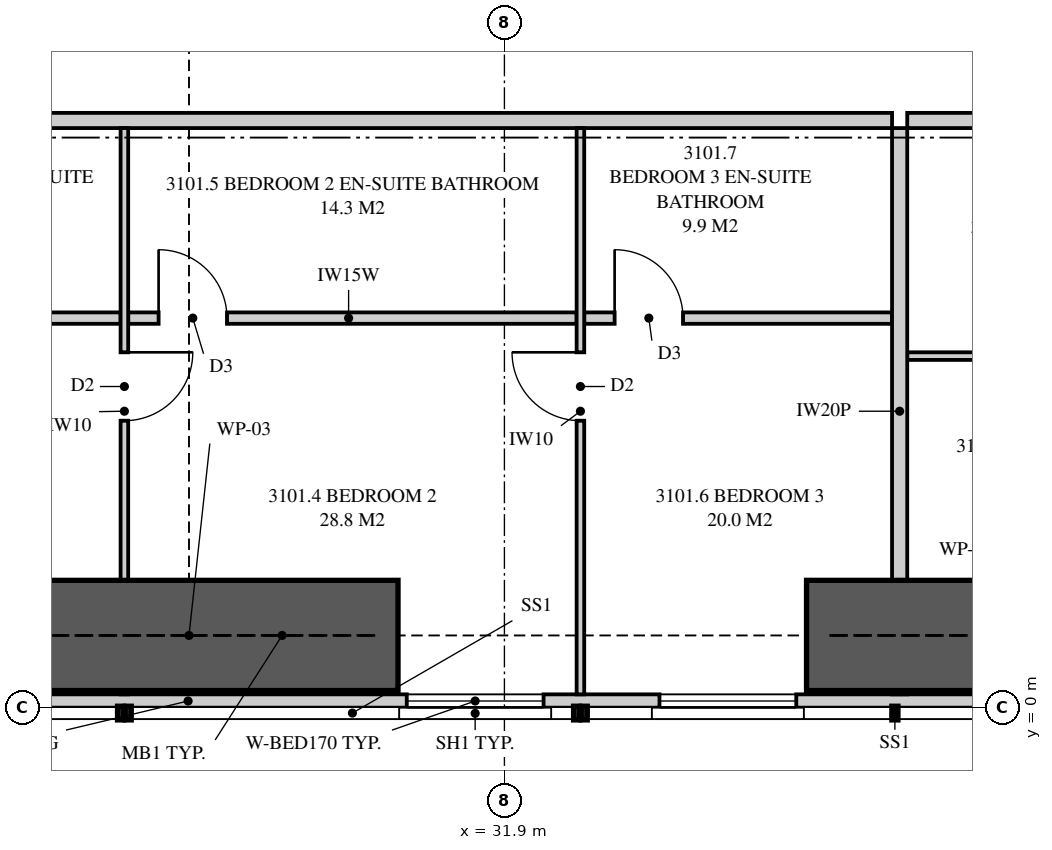
"""IFC4 building model, lengths in metres.
Left out: names, types, materials, properties, quantities, classifications, styles, units other than length and angle.
Written with IfcOpenShell. Run it as: python <this file> out.ifc"""

import sys

from ifc_helpers import new_model, si_unit, direction, frame, frame_2d, origin, place, context, subcontext, project, spatial, polyline, rectangle, outline, extrude, element, fill, save


model = new_model("IFC4")
c1 = context("Model", 3, precision=1e-05, world=origin(), true_north=direction((0.0, 1.0)))
c2 = subcontext(c1, "Body", "Model", "MODEL_VIEW")
j1 = project(units=[si_unit("LENGTHUNIT", "METRE"), si_unit("PLANEANGLEUNIT", "RADIAN")], contexts=[c1])
p1 = place(None, origin())
s1 = spatial("IfcSite", under=j1, at=p1, CompositionType="ELEMENT")
p2 = place(p1, origin())
s2 = spatial("IfcBuilding", under=s1, at=p2, CompositionType="ELEMENT")
p3 = place(p2, frame((0.0, 0.0, 114.9)))
s3 = spatial("IfcBuildingStorey", under=s2, at=p3, CompositionType="ELEMENT", Elevation=114.9)
p4 = place(p3, frame((14.051, 0.087, 0.0), z_axis=(0.0, 0.0, 1.0), x_axis=(1.0, 0.0, 0.0)))
e1 = element("IfcWall", 1, at=p4, inside=s3, PredefinedType="SOLIDWALL", context=c2, shape_type="SweptSolid", body=[
    extrude(outline(polyline([(0.0, 0.0), (27.374, 0.0), (27.374, 3.11), (24.777, 3.11), (24.777, 2.15), (24.732, 2.15), (24.732, 3.11), (24.574, 3.11), (24.574, 2.15), (2.824, 2.15), (2.824, 3.11), (2.666, 3.11), (2.666, 2.15), (2.62, 2.15), (2.62, 3.11), (0.0, 3.11), (0.0, 0.0)])), frame((0.0, 0.087, 0.0), z_axis=(0.0, -1.0, 0.0), x_axis=(1.0, 0.0, 0.0)), (0.0, 0.0, 1.0), 0.175),
])
p5 = place(p4, frame((5.874, 0.0, 0.4)))
e2 = element("IfcOpeningElement", 2, at=p5, cuts=e1, PredefinedType="OPENING", context=c2, shape_type="SweptSolid", body=[
    extrude(rectangle(XDim=1.8, YDim=1.7, at=frame_2d((0.9, 0.85))), frame((0.0, 0.097, 0.0), z_axis=(0.0, -1.0, 0.0), x_axis=(1.0, 0.0, 0.0)), (0.0, 0.0, 1.0), 0.195),
])
p6 = place(p4, frame((9.04, 0.0, 0.4)))
e3 = element("IfcOpeningElement", 3, at=p6, cuts=e1, PredefinedType="OPENING", context=c2, shape_type="SweptSolid", body=[
    extrude(rectangle(XDim=1.8, YDim=1.7, at=frame_2d((0.9, 0.85))), frame((0.0, 0.097, 0.0), z_axis=(0.0, -1.0, 0.0), x_axis=(1.0, 0.0, 0.0)), (0.0, 0.0, 1.0), 0.195),
])
p7 = place(p4, frame((16.564, 0.0, 0.4)))
e4 = element("IfcOpeningElement", 4, at=p7, cuts=e1, PredefinedType="OPENING", context=c2, shape_type="SweptSolid", body=[
    extrude(rectangle(XDim=1.8, YDim=1.7, at=frame_2d((0.9, 0.85))), frame((0.0, 0.097, 0.0), z_axis=(0.0, -1.0, 0.0), x_axis=(1.0, 0.0, 0.0)), (0.0, 0.0, 1.0), 0.195),
])
p8 = place(p4, frame((19.889, 0.0, 0.4)))
e5 = element("IfcOpeningElement", 5, at=p8, cuts=e1, PredefinedType="OPENING", context=c2, shape_type="SweptSolid", body=[
    extrude(rectangle(XDim=1.8, YDim=1.7, at=frame_2d((0.9, 0.85))), frame((0.0, 0.097, 0.0), z_axis=(0.0, -1.0, 0.0), x_axis=(1.0, 0.0, 0.0)), (0.0, 0.0, 1.0), 0.195),
])
p9 = place(p3, frame((37.1, 0.175, 0.0), z_axis=(0.0, 0.0, 1.0), x_axis=(0.0, 1.0, 0.0)))
e6 = element("IfcWall", 6, at=p9, inside=s3, PredefinedType="PARTITIONING", context=c2, shape_type="SweptSolid", body=[
    extrude(outline(polyline([(0.529, 2.15), (0.0, 2.15), (0.0, 0.0), (0.529, 0.0), (0.529, 0.462), (1.021, 0.462), (1.021, 0.0), (7.45, 0.0), (7.45, 3.11), (1.685, 3.11), (1.685, 2.15), (1.021, 2.15), (1.021, 1.688), (0.529, 1.688), (0.529, 2.15)])), frame((0.0, 0.1, 0.0), z_axis=(0.0, -1.0, 0.0), x_axis=(1.0, 0.0, 0.0)), (0.0, 0.0, 1.0), 0.2),
])
p10 = place(p3, frame((17.775, 7.725, 0.0), z_axis=(0.0, 0.0, 1.0), x_axis=(1.0, 0.0, 0.0)))
e7 = element("IfcWall", 7, at=p10, inside=s3, PredefinedType="PARTITIONING", context=c2, shape_type="SweptSolid", body=[
    extrude(outline(polyline([(0.0, 0.0), (19.225, 0.0), (19.225, 3.11), (10.312, 3.11), (10.312, 2.541), (9.638, 2.541), (9.638, 3.11), (0.0, 3.11), (0.0, 0.0)])), frame((0.0, 0.1, 0.0), z_axis=(0.0, -1.0, 0.0), x_axis=(1.0, 0.0, 0.0)), (0.0, 0.0, 1.0), 0.2),
])
p11 = place(p10, frame((3.275, 0.0, 0.0)))
e8 = element("IfcOpeningElement", 8, at=p11, cuts=e7, PredefinedType="OPENING", context=c2, shape_type="SweptSolid", body=[
    extrude(rectangle(XDim=1.05, YDim=2.2, at=frame_2d((0.525, 1.1))), frame((0.0, 0.11, 0.0), z_axis=(0.0, -1.0, 0.0), x_axis=(1.0, 0.0, 0.0)), (0.0, 0.0, 1.0), 0.22),
])
p12 = place(p3, frame((26.9, 0.175, 0.0), z_axis=(0.0, 0.0, 1.0), x_axis=(0.0, 1.0, 0.0)))
e9 = element("IfcWall", 9, at=p12, inside=s3, PredefinedType="PARTITIONING", context=c2, shape_type="SweptSolid", body=[
    extrude(outline(polyline([(0.529, 2.15), (0.0, 2.15), (0.0, 0.0), (0.529, 0.0), (0.529, 0.889), (1.021, 0.889), (1.021, 0.0), (7.45, 0.0), (7.45, 3.11), (1.635, 3.11), (1.635, 2.15), (1.021, 2.15), (1.021, 1.261), (0.529, 1.261), (0.529, 2.15)])), frame((0.0, 0.05, 0.0), z_axis=(0.0, -1.0, 0.0), x_axis=(1.0, 0.0, 0.0)), (0.0, 0.0, 1.0), 0.1),
])
p13 = place(p12, frame((3.6, 0.0, 0.0)))
e10 = element("IfcOpeningElement", 10, at=p13, cuts=e9, PredefinedType="OPENING", context=c2, shape_type="SweptSolid", body=[
    extrude(rectangle(XDim=0.9, YDim=2.1, at=frame_2d((0.45, 1.05))), frame((0.0, 0.06, 0.0), z_axis=(0.0, -1.0, 0.0), x_axis=(1.0, 0.0, 0.0)), (0.0, 0.0, 1.0), 0.12),
])
p14 = place(p3, frame((32.9, 0.175, 0.0), z_axis=(0.0, 0.0, 1.0), x_axis=(0.0, 1.0, 0.0)))
e11 = element("IfcWall", 11, at=p14, inside=s3, PredefinedType="PARTITIONING", context=c2, shape_type="SweptSolid", body=[
    extrude(outline(polyline([(0.0, 0.0), (7.45, 0.0), (7.45, 3.11), (1.635, 3.11), (1.635, 2.15), (0.0, 2.15), (0.0, 3.11), (0.0, 0.0)])), frame((0.0, 0.05, 0.0), z_axis=(0.0, -1.0, 0.0), x_axis=(1.0, 0.0, 0.0)), (0.0, 0.0, 1.0), 0.1),
])
p15 = place(p14, frame((3.6, 0.0, 0.0)))
e12 = element("IfcOpeningElement", 12, at=p15, cuts=e11, PredefinedType="OPENING", context=c2, shape_type="SweptSolid", body=[
    extrude(rectangle(XDim=0.9, YDim=2.1, at=frame_2d((0.45, 1.05))), frame((0.0, 0.06, 0.0), z_axis=(0.0, -1.0, 0.0), x_axis=(1.0, 0.0, 0.0)), (0.0, 0.0, 1.0), 0.12),
])
p16 = place(p3, frame((22.7, 5.125, 0.0), z_axis=(0.0, 0.0, 1.0), x_axis=(1.0, 0.0, 0.0)))
e13 = element("IfcWall", 13, at=p16, inside=s3, PredefinedType="PLUMBINGWALL", context=c2, shape_type="SweptSolid", body=[
    extrude(rectangle(XDim=4.15, YDim=0.15, at=frame_2d((2.075, 0.0))), origin(), (0.0, 0.0, 1.0), 3.11),
])
p17 = place(p16, frame((0.4, 0.0, 0.0)))
e14 = element("IfcOpeningElement", 14, at=p17, cuts=e13, PredefinedType="OPENING", context=c2, shape_type="SweptSolid", body=[
    extrude(rectangle(XDim=0.9, YDim=2.1, at=frame_2d((0.45, 1.05))), frame((0.0, 0.085, 0.0), z_axis=(0.0, -1.0, 0.0), x_axis=(1.0, 0.0, 0.0)), (0.0, 0.0, 1.0), 0.17),
])
p18 = place(p3, frame((26.95, 5.125, 0.0), z_axis=(0.0, 0.0, 1.0), x_axis=(1.0, 0.0, 0.0)))
e15 = element("IfcWall", 15, at=p18, inside=s3, PredefinedType="PLUMBINGWALL", context=c2, shape_type="SweptSolid", body=[
    extrude(outline(polyline([(0.0, 0.0), (5.9, 0.0), (5.9, 3.11), (1.112, 3.11), (1.112, 2.541), (0.488, 2.541), (0.488, 3.11), (0.0, 3.11), (0.0, 0.0)])), frame((0.0, 0.075, 0.0), z_axis=(0.0, -1.0, 0.0), x_axis=(1.0, 0.0, 0.0)), (0.0, 0.0, 1.0), 0.15),
])
p19 = place(p18, frame((0.4, 0.0, 0.0)))
e16 = element("IfcOpeningElement", 16, at=p19, cuts=e15, PredefinedType="OPENING", context=c2, shape_type="SweptSolid", body=[
    extrude(rectangle(XDim=0.9, YDim=2.1, at=frame_2d((0.45, 1.05))), frame((0.0, 0.085, 0.0), z_axis=(0.0, -1.0, 0.0), x_axis=(1.0, 0.0, 0.0)), (0.0, 0.0, 1.0), 0.17),
])
p20 = place(p3, frame((32.95, 5.125, 0.0), z_axis=(0.0, 0.0, 1.0), x_axis=(1.0, 0.0, 0.0)))
e17 = element("IfcWall", 17, at=p20, inside=s3, PredefinedType="PLUMBINGWALL", context=c2, shape_type="SweptSolid", body=[
    extrude(rectangle(XDim=4.05, YDim=0.15, at=frame_2d((2.025, 0.0))), origin(), (0.0, 0.0, 1.0), 3.11),
])
p21 = place(p20, frame((0.4, 0.0, 0.0)))
e18 = element("IfcOpeningElement", 18, at=p21, cuts=e17, PredefinedType="OPENING", context=c2, shape_type="SweptSolid", body=[
    extrude(rectangle(XDim=0.9, YDim=2.1, at=frame_2d((0.45, 1.05))), frame((0.0, 0.085, 0.0), z_axis=(0.0, -1.0, 0.0), x_axis=(1.0, 0.0, 0.0)), (0.0, 0.0, 1.0), 0.17),
])
p22 = place(p3, frame((37.2, 7.725, 0.0), z_axis=(0.0, 0.0, 1.0), x_axis=(1.0, 0.0, 0.0)))
e19 = element("IfcWall", 19, at=p22, inside=s3, PredefinedType="PARTITIONING", context=c2, shape_type="SweptSolid", body=[
    extrude(outline(polyline([(0.0, 0.0), (8.825, 0.0), (8.825, 3.11), (1.762, 3.11), (1.762, 2.541), (1.088, 2.541), (1.088, 3.11), (0.0, 3.11), (0.0, 0.0)])), frame((0.0, 0.1, 0.0), z_axis=(0.0, -1.0, 0.0), x_axis=(1.0, 0.0, 0.0)), (0.0, 0.0, 1.0), 0.2),
])
p23 = place(p22, frame((2.4, 0.0, 0.0)))
e20 = element("IfcOpeningElement", 20, at=p23, cuts=e19, PredefinedType="OPENING", context=c2, shape_type="SweptSolid", body=[
    extrude(rectangle(XDim=1.05, YDim=2.2, at=frame_2d((0.525, 1.1))), frame((0.0, 0.11, 0.0), z_axis=(0.0, -1.0, 0.0), x_axis=(1.0, 0.0, 0.0)), (0.0, 0.0, 1.0), 0.22),
])
p24 = place(p3, frame((37.2, 4.625, 0.0), z_axis=(0.0, 0.0, 1.0), x_axis=(1.0, 0.0, 0.0)))
e21 = element("IfcWall", 21, at=p24, inside=s3, PredefinedType="PARTITIONING", context=c2, shape_type="SweptSolid", body=[
    extrude(outline(polyline([(0.0, 0.0), (3.55, 0.0), (3.55, 3.11), (1.712, 3.11), (1.712, 2.541), (1.138, 2.541), (1.138, 3.11), (0.0, 3.11), (0.0, 0.0)])), frame((0.0, 0.05, 0.0), z_axis=(0.0, -1.0, 0.0), x_axis=(1.0, 0.0, 0.0)), (0.0, 0.0, 1.0), 0.1),
])
p25 = place(p24, frame((1.35, 0.0, 0.0)))
e22 = element("IfcOpeningElement", 22, at=p25, cuts=e21, PredefinedType="OPENING", context=c2, shape_type="SweptSolid", body=[
    extrude(rectangle(XDim=0.9, YDim=2.1, at=frame_2d((0.45, 1.05))), frame((0.0, 0.06, 0.0), z_axis=(0.0, -1.0, 0.0), x_axis=(1.0, 0.0, 0.0)), (0.0, 0.0, 1.0), 0.12),
])
for number, where, z_axis, x_axis in (
    (23, (25.0, 0.95, 0.0), (0.0, 0.0, 1.0), (1.0, 0.0, 0.0)),
    (24, (35.875, 0.95, 0.0), (0.0, 0.0, 1.0), (1.0, 0.0, 0.0)),
):
    element("IfcWall", number, at=place(p3, frame(where, z_axis=z_axis, x_axis=x_axis)), inside=s3, PredefinedType="SHEAR", context=c2, shape_type="SweptSolid", body=[
        extrude(rectangle(XDim=5.5, YDim=1.45, at=frame_2d((2.75, 0.0))), origin(), (0.0, 0.0, 1.0), 3.35),
    ])
p26 = place(p7, origin())
e25 = element("IfcWindow", 25, at=p26, inside=s3, PartitioningType="SINGLE_PANEL", PredefinedType="WINDOW", context=c2, shape_type="SweptSolid", body=[
    extrude(rectangle(XDim=1.8, YDim=1.7, at=frame_2d((0.9, 0.85))), frame((0.0, 0.03, 0.0), z_axis=(0.0, -1.0, 0.0), x_axis=(1.0, 0.0, 0.0)), (0.0, 0.0, 1.0), 0.06),
])
fill(e4, e25)
p27 = place(p8, origin())
e26 = element("IfcWindow", 26, at=p27, inside=s3, PartitioningType="SINGLE_PANEL", PredefinedType="WINDOW", context=c2, shape_type="SweptSolid", body=[
    extrude(rectangle(XDim=1.8, YDim=1.7, at=frame_2d((0.9, 0.85))), frame((0.0, 0.03, 0.0), z_axis=(0.0, -1.0, 0.0), x_axis=(1.0, 0.0, 0.0)), (0.0, 0.0, 1.0), 0.06),
])
fill(e5, e26)
p28 = place(p13, frame((0.9, 0.0, 0.0), z_axis=(0.0, 0.0, 1.0), x_axis=(-1.0, 0.0, 0.0)))
e27 = element("IfcDoor", 27, at=p28, inside=s3, OperationType="SINGLE_SWING_LEFT", PredefinedType="DOOR", context=c2, shape_type="SweptSolid", body=[
    extrude(rectangle(XDim=0.9, YDim=2.1, at=frame_2d((0.45, 1.05))), frame((0.0, 0.025, 0.0), z_axis=(0.0, -1.0, 0.0), x_axis=(1.0, 0.0, 0.0)), (0.0, 0.0, 1.0), 0.05),
])
fill(e10, e27)
p29 = place(p19, origin())
e28 = element("IfcDoor", 28, at=p29, inside=s3, OperationType="SINGLE_SWING_LEFT", PredefinedType="DOOR", context=c2, shape_type="SweptSolid", body=[
    extrude(rectangle(XDim=0.9, YDim=2.1, at=frame_2d((0.45, 1.05))), frame((0.0, 0.025, 0.0), z_axis=(0.0, -1.0, 0.0), x_axis=(1.0, 0.0, 0.0)), (0.0, 0.0, 1.0), 0.05),
])
fill(e16, e28)
p30 = place(p15, origin())
e29 = element("IfcDoor", 29, at=p30, inside=s3, OperationType="SINGLE_SWING_RIGHT", PredefinedType="DOOR", context=c2, shape_type="SweptSolid", body=[
    extrude(rectangle(XDim=0.9, YDim=2.1, at=frame_2d((0.45, 1.05))), frame((0.0, 0.025, 0.0), z_axis=(0.0, -1.0, 0.0), x_axis=(1.0, 0.0, 0.0)), (0.0, 0.0, 1.0), 0.05),
])
fill(e12, e29)
p31 = place(p21, origin())
e30 = element("IfcDoor", 30, at=p31, inside=s3, OperationType="SINGLE_SWING_LEFT", PredefinedType="DOOR", context=c2, shape_type="SweptSolid", body=[
    extrude(rectangle(XDim=0.9, YDim=2.1, at=frame_2d((0.45, 1.05))), frame((0.0, 0.025, 0.0), z_axis=(0.0, -1.0, 0.0), x_axis=(1.0, 0.0, 0.0)), (0.0, 0.0, 1.0), 0.05),
])
fill(e18, e30)
save(model, sys.argv[1])
